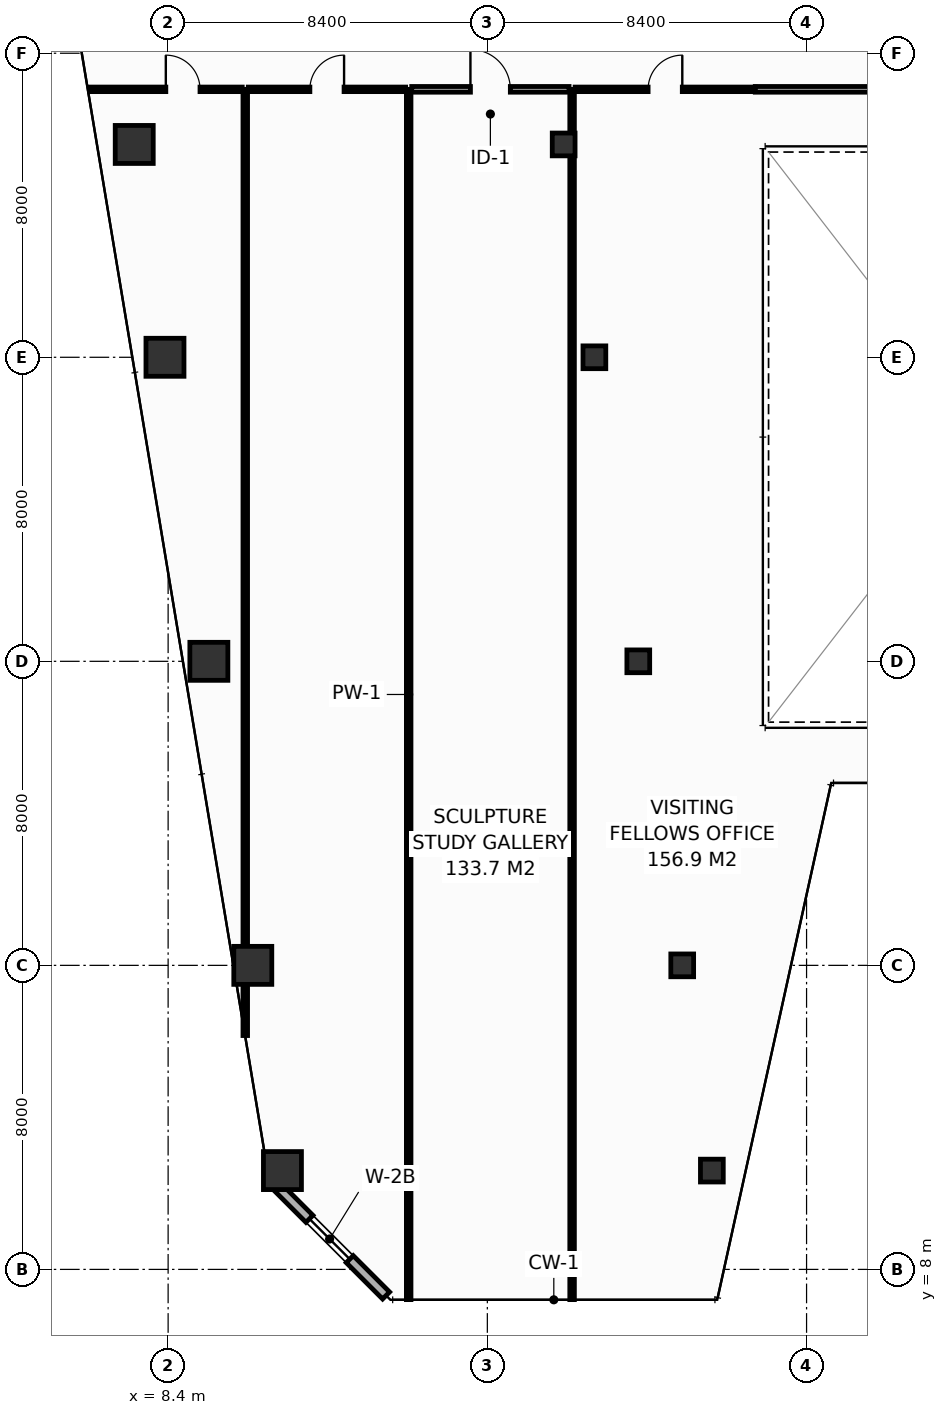
"""IFC4 building model, lengths in metres.
Left out: names, types, materials, properties, quantities, classifications, styles, units other than length and angle.
Written with IfcOpenShell. Run it as: python <this file> out.ifc"""

import sys

from ifc_helpers import new_model, si_unit, direction, frame, frame_2d, origin, origin_2d, place, context, subcontext, project, spatial, rectangle, hollow_rectangle, extrude, element, fill, save


model = new_model("IFC4")
c1 = context("Model", 3, precision=1e-05, world=origin(), true_north=direction((0.0, 1.0)))
c2 = subcontext(c1, "Body", "Model", "MODEL_VIEW")
j1 = project(units=[si_unit("LENGTHUNIT", "METRE"), si_unit("PLANEANGLEUNIT", "RADIAN")], contexts=[c1])
p1 = place(None, origin())
s1 = spatial("IfcSite", under=j1, at=p1, CompositionType="ELEMENT")
p2 = place(p1, origin())
s2 = spatial("IfcBuilding", under=s1, at=p2, CompositionType="ELEMENT")
p3 = place(p2, frame((0.0, 0.0, 119.2)))
s3 = spatial("IfcBuildingStorey", under=s2, at=p3, CompositionType="ELEMENT", Elevation=119.2)
p4 = place(p3, frame((11.408, 10.6, 0.0), z_axis=(0.0, 0.0, 1.0), x_axis=(1.0, 0.0, 0.0)))
e1 = element("IfcColumn", 1, at=p4, inside=s3, PredefinedType="COLUMN", context=c2, shape_type="SweptSolid", body=[
    extrude(hollow_rectangle(XDim=1.0, YDim=1.0, WallThickness=0.045, at=origin_2d()), origin(), (0.0, 0.0, 1.0), 4.4),
])
p5 = place(p3, frame((22.708, 10.6, 0.0), z_axis=(0.0, 0.0, 1.0), x_axis=(1.0, 0.0, 0.0)))
e2 = element("IfcColumn", 2, at=p5, inside=s3, PredefinedType="COLUMN", context=c2, shape_type="SweptSolid", body=[
    extrude(hollow_rectangle(XDim=0.6, YDim=0.6, WallThickness=0.028, at=origin_2d()), origin(), (0.0, 0.0, 1.0), 4.4),
])
p6 = place(p3, frame((10.628, 16.0, 0.0), z_axis=(0.0, 0.0, 1.0), x_axis=(1.0, 0.0, 0.0)))
e3 = element("IfcColumn", 3, at=p6, inside=s3, PredefinedType="COLUMN", context=c2, shape_type="SweptSolid", body=[
    extrude(hollow_rectangle(XDim=1.0, YDim=1.0, WallThickness=0.045, at=origin_2d()), origin(), (0.0, 0.0, 1.0), 4.4),
])
p7 = place(p3, frame((21.928, 16.0, 0.0), z_axis=(0.0, 0.0, 1.0), x_axis=(1.0, 0.0, 0.0)))
e4 = element("IfcColumn", 4, at=p7, inside=s3, PredefinedType="COLUMN", context=c2, shape_type="SweptSolid", body=[
    extrude(hollow_rectangle(XDim=0.6, YDim=0.6, WallThickness=0.028, at=origin_2d()), origin(), (0.0, 0.0, 1.0), 4.4),
])
p8 = place(p3, frame((9.472, 24.0, 0.0), z_axis=(0.0, 0.0, 1.0), x_axis=(1.0, 0.0, 0.0)))
e5 = element("IfcColumn", 5, at=p8, inside=s3, PredefinedType="COLUMN", context=c2, shape_type="SweptSolid", body=[
    extrude(hollow_rectangle(XDim=1.0, YDim=1.0, WallThickness=0.045, at=origin_2d()), origin(), (0.0, 0.0, 1.0), 4.4),
])
p9 = place(p3, frame((20.772, 24.0, 0.0), z_axis=(0.0, 0.0, 1.0), x_axis=(1.0, 0.0, 0.0)))
e6 = element("IfcColumn", 6, at=p9, inside=s3, PredefinedType="COLUMN", context=c2, shape_type="SweptSolid", body=[
    extrude(hollow_rectangle(XDim=0.6, YDim=0.6, WallThickness=0.028, at=origin_2d()), origin(), (0.0, 0.0, 1.0), 4.4),
])
p10 = place(p3, frame((8.317, 32.0, 0.0), z_axis=(0.0, 0.0, 1.0), x_axis=(1.0, 0.0, 0.0)))
e7 = element("IfcColumn", 7, at=p10, inside=s3, PredefinedType="COLUMN", context=c2, shape_type="SweptSolid", body=[
    extrude(hollow_rectangle(XDim=1.0, YDim=1.0, WallThickness=0.045, at=origin_2d()), origin(), (0.0, 0.0, 1.0), 4.4),
])
p11 = place(p3, frame((19.617, 32.0, 0.0), z_axis=(0.0, 0.0, 1.0), x_axis=(1.0, 0.0, 0.0)))
e8 = element("IfcColumn", 8, at=p11, inside=s3, PredefinedType="COLUMN", context=c2, shape_type="SweptSolid", body=[
    extrude(hollow_rectangle(XDim=0.6, YDim=0.6, WallThickness=0.028, at=origin_2d()), origin(), (0.0, 0.0, 1.0), 4.4),
])
p12 = place(p3, frame((7.508, 37.6, 0.0), z_axis=(0.0, 0.0, 1.0), x_axis=(1.0, 0.0, 0.0)))
e9 = element("IfcColumn", 9, at=p12, inside=s3, PredefinedType="COLUMN", context=c2, shape_type="SweptSolid", body=[
    extrude(hollow_rectangle(XDim=1.0, YDim=1.0, WallThickness=0.045, at=origin_2d()), origin(), (0.0, 0.0, 1.0), 4.4),
])
p13 = place(p3, frame((18.808, 37.6, 0.0), z_axis=(0.0, 0.0, 1.0), x_axis=(1.0, 0.0, 0.0)))
e10 = element("IfcColumn", 10, at=p13, inside=s3, PredefinedType="COLUMN", context=c2, shape_type="SweptSolid", body=[
    extrude(hollow_rectangle(XDim=0.6, YDim=0.6, WallThickness=0.028, at=origin_2d()), origin(), (0.0, 0.0, 1.0), 4.4),
])
p14 = place(p3, frame((11.162, 10.287, 0.0), z_axis=(0.0, 0.0, 1.0), x_axis=(0.70707775441, -0.707135806771, 0.0)))
e11 = element("IfcWall", 11, at=p14, inside=s3, PredefinedType="STANDARD", context=c2, shape_type="SweptSolid", body=[
    extrude(rectangle(XDim=4.206, YDim=0.26, at=frame_2d((2.103, 0.0))), origin(), (0.0, 0.0, 1.0), 3.95),
])
p15 = place(p14, frame((1.353, 0.0, 0.9)))
e12 = element("IfcOpeningElement", 12, at=p15, cuts=e11, PredefinedType="OPENING", context=c2, shape_type="SweptSolid", body=[
    extrude(rectangle(XDim=1.5, YDim=1.85, at=frame_2d((0.75, 0.925))), frame((0.0, 0.14, 0.0), z_axis=(0.0, -1.0, 0.0), x_axis=(1.0, 0.0, 0.0)), (0.0, 0.0, 1.0), 0.28),
])
p16 = place(p3, frame((10.43, 14.153, 0.0), z_axis=(0.0, 0.0, 1.0), x_axis=(0.0, 1.0, 0.0)))
e13 = element("IfcWall", 13, at=p16, inside=s3, PredefinedType="PARTITIONING", context=c2, shape_type="SweptSolid", body=[
    extrude(rectangle(XDim=24.897, YDim=0.12, at=frame_2d((12.448, 0.0))), origin(), (0.0, 0.0, 1.0), 3.135),
])
for number, where, z_axis, x_axis in (
    (14, (14.73, 7.205, 0.0), (0.0, 0.0, 1.0), (0.0, 1.0, 0.0)),
    (15, (19.03, 7.205, 0.0), (0.0, 0.0, 1.0), (0.0, 1.0, 0.0)),
):
    element("IfcWall", number, at=place(p3, frame(where, z_axis=z_axis, x_axis=x_axis)), inside=s3, PredefinedType="PARTITIONING", context=c2, shape_type="SweptSolid", body=[
        extrude(rectangle(XDim=31.845, YDim=0.12, at=frame_2d((15.922, 0.0))), origin(), (0.0, 0.0, 1.0), 3.135),
    ])
p17 = place(p3, frame((6.348, 39.05, 0.0), z_axis=(0.0, 0.0, 1.0), x_axis=(1.0, 0.0, 0.0)))
e16 = element("IfcWall", 16, at=p17, inside=s3, PredefinedType="PARTITIONING", context=c2, shape_type="SweptSolid", body=[
    extrude(rectangle(XDim=4.002, YDim=0.12, at=frame_2d((2.001, 0.0))), origin(), (0.0, 0.0, 1.0), 3.435),
])
p18 = place(p17, frame((1.991, 0.0, 0.0)))
e17 = element("IfcOpeningElement", 17, at=p18, cuts=e16, PredefinedType="OPENING", context=c2, shape_type="SweptSolid", body=[
    extrude(rectangle(XDim=0.9, YDim=2.1, at=frame_2d((0.45, 1.05))), frame((0.0, 0.07, 0.0), z_axis=(0.0, -1.0, 0.0), x_axis=(1.0, 0.0, 0.0)), (0.0, 0.0, 1.0), 0.14),
])
p19 = place(p3, frame((10.51, 39.05, 0.0), z_axis=(0.0, 0.0, 1.0), x_axis=(1.0, 0.0, 0.0)))
e18 = element("IfcWall", 18, at=p19, inside=s3, PredefinedType="PARTITIONING", context=c2, shape_type="SweptSolid", body=[
    extrude(rectangle(XDim=4.14, YDim=0.12, at=frame_2d((2.07, 0.0))), origin(), (0.0, 0.0, 1.0), 3.95),
])
p20 = place(p19, frame((1.62, 0.0, 0.0)))
e19 = element("IfcOpeningElement", 19, at=p20, cuts=e18, PredefinedType="OPENING", context=c2, shape_type="SweptSolid", body=[
    extrude(rectangle(XDim=0.9, YDim=2.1, at=frame_2d((0.45, 1.05))), frame((0.0, 0.07, 0.0), z_axis=(0.0, -1.0, 0.0), x_axis=(1.0, 0.0, 0.0)), (0.0, 0.0, 1.0), 0.14),
])
p21 = place(p3, frame((14.81, 39.05, 0.0), z_axis=(0.0, 0.0, 1.0), x_axis=(1.0, 0.0, 0.0)))
e20 = element("IfcWall", 20, at=p21, inside=s3, PredefinedType="PARTITIONING", context=c2, shape_type="SweptSolid", body=[
    extrude(rectangle(XDim=4.14, YDim=0.15, at=frame_2d((2.07, 0.0))), origin(), (0.0, 0.0, 1.0), 3.95),
])
p22 = place(p21, frame((1.545, 0.0, 0.0)))
e21 = element("IfcOpeningElement", 21, at=p22, cuts=e20, PredefinedType="OPENING", context=c2, shape_type="SweptSolid", body=[
    extrude(rectangle(XDim=1.05, YDim=2.15, at=frame_2d((0.525, 1.075))), frame((0.0, 0.085, 0.0), z_axis=(0.0, -1.0, 0.0), x_axis=(1.0, 0.0, 0.0)), (0.0, 0.0, 1.0), 0.17),
])
p23 = place(p3, frame((19.11, 39.05, 0.0), z_axis=(0.0, 0.0, 1.0), x_axis=(1.0, 0.0, 0.0)))
e22 = element("IfcWall", 22, at=p23, inside=s3, PredefinedType="PARTITIONING", context=c2, shape_type="SweptSolid", body=[
    extrude(rectangle(XDim=4.74, YDim=0.12, at=frame_2d((2.37, 0.0))), origin(), (0.0, 0.0, 1.0), 3.135),
])
p24 = place(p23, frame((1.92, 0.0, 0.0)))
e23 = element("IfcOpeningElement", 23, at=p24, cuts=e22, PredefinedType="OPENING", context=c2, shape_type="SweptSolid", body=[
    extrude(rectangle(XDim=0.9, YDim=2.1, at=frame_2d((0.45, 1.05))), frame((0.0, 0.07, 0.0), z_axis=(0.0, -1.0, 0.0), x_axis=(1.0, 0.0, 0.0)), (0.0, 0.0, 1.0), 0.14),
])
p25 = place(p3, frame((23.85, 39.05, 0.0), z_axis=(0.0, 0.0, 1.0), x_axis=(1.0, 0.0, 0.0)))
e24 = element("IfcWall", 24, at=p25, inside=s3, PredefinedType="PARTITIONING", context=c2, shape_type="SweptSolid", body=[
    extrude(rectangle(XDim=12.3, YDim=0.15, at=frame_2d((6.15, 0.0))), origin(), (0.0, 0.0, 1.0), 3.95),
])
p26 = place(p15, origin())
e25 = element("IfcWindow", 25, at=p26, inside=s3, PartitioningType="SINGLE_PANEL", PredefinedType="WINDOW", context=c2, shape_type="SweptSolid", body=[
    extrude(rectangle(XDim=1.5, YDim=1.85, at=frame_2d((0.75, 0.925))), frame((0.0, 0.03, 0.0), z_axis=(0.0, -1.0, 0.0), x_axis=(1.0, 0.0, 0.0)), (0.0, 0.0, 1.0), 0.06),
])
fill(e12, e25)
p27 = place(p18, origin())
e26 = element("IfcDoor", 26, at=p27, inside=s3, OperationType="SINGLE_SWING_LEFT", PredefinedType="DOOR", context=c2, shape_type="SweptSolid", body=[
    extrude(rectangle(XDim=0.9, YDim=2.1, at=frame_2d((0.45, 1.05))), frame((0.0, 0.025, 0.0), z_axis=(0.0, -1.0, 0.0), x_axis=(1.0, 0.0, 0.0)), (0.0, 0.0, 1.0), 0.05),
])
fill(e17, e26)
p28 = place(p20, origin())
e27 = element("IfcDoor", 27, at=p28, inside=s3, OperationType="SINGLE_SWING_RIGHT", PredefinedType="DOOR", context=c2, shape_type="SweptSolid", body=[
    extrude(rectangle(XDim=0.9, YDim=2.1, at=frame_2d((0.45, 1.05))), frame((0.0, 0.025, 0.0), z_axis=(0.0, -1.0, 0.0), x_axis=(1.0, 0.0, 0.0)), (0.0, 0.0, 1.0), 0.05),
])
fill(e19, e27)
p29 = place(p22, origin())
e28 = element("IfcDoor", 28, at=p29, inside=s3, OperationType="SINGLE_SWING_LEFT", PredefinedType="DOOR", context=c2, shape_type="SweptSolid", body=[
    extrude(rectangle(XDim=1.05, YDim=2.15, at=frame_2d((0.525, 1.075))), frame((0.0, 0.025, 0.0), z_axis=(0.0, -1.0, 0.0), x_axis=(1.0, 0.0, 0.0)), (0.0, 0.0, 1.0), 0.05),
])
fill(e21, e28)
p30 = place(p24, origin())
e29 = element("IfcDoor", 29, at=p30, inside=s3, OperationType="SINGLE_SWING_RIGHT", PredefinedType="DOOR", context=c2, shape_type="SweptSolid", body=[
    extrude(rectangle(XDim=0.9, YDim=2.1, at=frame_2d((0.45, 1.05))), frame((0.0, 0.025, 0.0), z_axis=(0.0, -1.0, 0.0), x_axis=(1.0, 0.0, 0.0)), (0.0, 0.0, 1.0), 0.05),
])
fill(e23, e29)
save(model, sys.argv[1])
